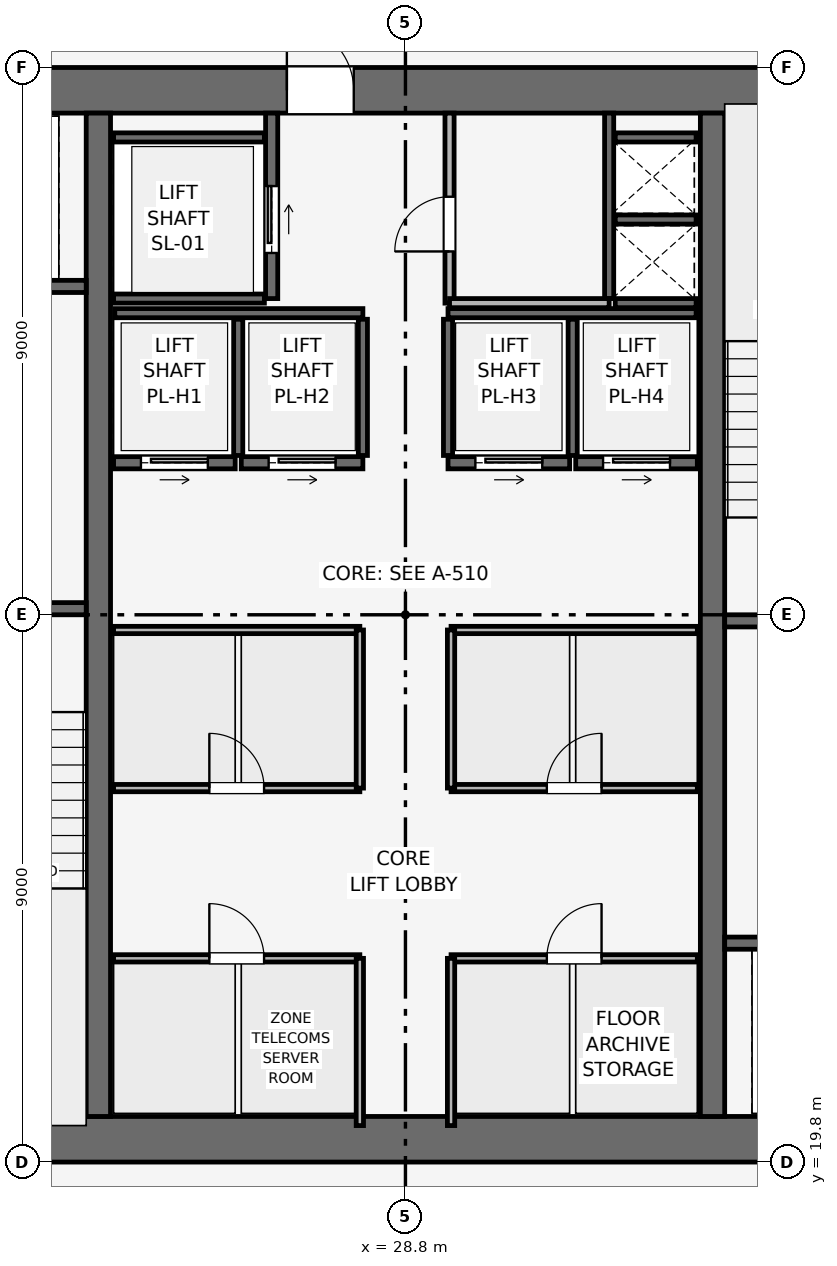
"""IFC4 building model, lengths in metres.
Left out: names, types, materials, properties, quantities, classifications, styles, units other than length and angle.
Written with IfcOpenShell. Run it as: python <this file> out.ifc"""

import sys

from ifc_helpers import new_model, si_unit, direction, frame, frame_2d, origin, place, context, subcontext, project, spatial, rectangle, extrude, element, fill, save


model = new_model("IFC4")
c1 = context("Model", 3, precision=1e-05, world=origin(), true_north=direction((0.0, 1.0)))
c2 = subcontext(c1, "Body", "Model", "MODEL_VIEW")
j1 = project(units=[si_unit("LENGTHUNIT", "METRE"), si_unit("PLANEANGLEUNIT", "RADIAN")], contexts=[c1])
p1 = place(None, origin())
s1 = spatial("IfcSite", under=j1, at=p1, CompositionType="ELEMENT")
p2 = place(p1, origin())
s2 = spatial("IfcBuilding", under=s1, at=p2, CompositionType="ELEMENT")
p3 = place(p2, frame((0.0, 0.0, 261.6)))
s3 = spatial("IfcBuildingStorey", under=s2, at=p3, CompositionType="ELEMENT", Elevation=261.6)
p4 = place(p3, frame((19.8, 20.175, 0.0), z_axis=(0.0, 0.0, 1.0), x_axis=(1.0, 0.0, 0.0)))
e1 = element("IfcWall", 1, at=p4, inside=s3, PredefinedType="SHEAR", context=c2, shape_type="SweptSolid", body=[
    extrude(rectangle(XDim=18.0, YDim=0.75, at=frame_2d((9.0, 0.0))), origin(), (0.0, 0.0, 1.0), 3.75),
])
p5 = place(p3, frame((19.8, 37.425, 0.0), z_axis=(0.0, 0.0, 1.0), x_axis=(1.0, 0.0, 0.0)))
e2 = element("IfcWall", 2, at=p5, inside=s3, PredefinedType="SHEAR", context=c2, shape_type="SweptSolid", body=[
    extrude(rectangle(XDim=18.0, YDim=0.75, at=frame_2d((9.0, 0.0))), origin(), (0.0, 0.0, 1.0), 3.75),
])
p6 = place(p5, frame((7.05, 0.0, 0.0)))
e3 = element("IfcOpeningElement", 3, at=p6, cuts=e2, PredefinedType="OPENING", context=c2, shape_type="SweptSolid", body=[
    extrude(rectangle(XDim=1.1, YDim=2.15, at=frame_2d((0.55, 1.075))), frame((0.0, 0.385, 0.0), z_axis=(0.0, -1.0, 0.0), x_axis=(1.0, 0.0, 0.0)), (0.0, 0.0, 1.0), 0.77),
])
for number, where, z_axis, x_axis in (
    (4, (23.75, 20.55, 0.0), (0.0, 0.0, 1.0), (0.0, 1.0, 0.0)),
    (5, (33.85, 20.55, 0.0), (0.0, 0.0, 1.0), (0.0, 1.0, 0.0)),
):
    element("IfcWall", number, at=place(p3, frame(where, z_axis=z_axis, x_axis=x_axis)), inside=s3, PredefinedType="SHEAR", context=c2, shape_type="SweptSolid", body=[
        extrude(rectangle(XDim=16.5, YDim=0.4, at=frame_2d((8.25, 0.0))), origin(), (0.0, 0.0, 1.0), 3.75),
    ])
p7 = place(p3, frame((20.4, 28.9, 0.0), z_axis=(0.0, 0.0, 1.0), x_axis=(1.0, 0.0, 0.0)))
e6 = element("IfcWall", 6, at=p7, inside=s3, PredefinedType="SHEAR", context=c2, shape_type="SweptSolid", body=[
    extrude(rectangle(XDim=3.15, YDim=0.2, at=frame_2d((1.575, 0.0))), origin(), (0.0, 0.0, 1.0), 3.5),
])
p8 = place(p7, frame((0.8, 0.0, 0.0)))
e7 = element("IfcOpeningElement", 7, at=p8, cuts=e6, PredefinedType="OPENING", context=c2, shape_type="SweptSolid", body=[
    extrude(rectangle(XDim=1.0, YDim=2.1, at=frame_2d((0.5, 1.05))), frame((0.0, 0.11, 0.0), z_axis=(0.0, -1.0, 0.0), x_axis=(1.0, 0.0, 0.0)), (0.0, 0.0, 1.0), 0.22),
])
p9 = place(p3, frame((34.05, 28.7, 0.0), z_axis=(0.0, 0.0, 1.0), x_axis=(1.0, 0.0, 0.0)))
e8 = element("IfcWall", 8, at=p9, inside=s3, PredefinedType="SHEAR", context=c2, shape_type="SweptSolid", body=[
    extrude(rectangle(XDim=3.15, YDim=0.2, at=frame_2d((1.575, 0.0))), origin(), (0.0, 0.0, 1.0), 3.5),
])
p10 = place(p9, frame((0.8, 0.0, 0.0)))
e9 = element("IfcOpeningElement", 9, at=p10, cuts=e8, PredefinedType="OPENING", context=c2, shape_type="SweptSolid", body=[
    extrude(rectangle(XDim=1.0, YDim=2.1, at=frame_2d((0.5, 1.05))), frame((0.0, 0.11, 0.0), z_axis=(0.0, -1.0, 0.0), x_axis=(1.0, 0.0, 0.0)), (0.0, 0.0, 1.0), 0.22),
])
p11 = place(p3, frame((32.15, 34.0, 0.0), z_axis=(0.0, 0.0, 1.0), x_axis=(0.0, 1.0, 0.0)))
e10 = element("IfcWall", 10, at=p11, inside=s3, PredefinedType="SHEAR", context=c2, shape_type="SweptSolid", body=[
    extrude(rectangle(XDim=3.05, YDim=0.15, at=frame_2d((1.525, 0.0))), origin(), (0.0, 0.0, 1.0), 3.5),
])
for number, where, z_axis, x_axis in (
    (11, (32.25, 33.925, 0.0), (0.0, 0.0, 1.0), (1.0, 0.0, 0.0)),
    (12, (32.25, 35.3, 0.0), (0.0, 0.0, 1.0), (1.0, 0.0, 0.0)),
):
    element("IfcWall", number, at=place(p3, frame(where, z_axis=z_axis, x_axis=x_axis)), inside=s3, PredefinedType="SHEAR", context=c2, shape_type="SweptSolid", body=[
        extrude(rectangle(XDim=1.33, YDim=0.15, at=frame_2d((0.665, 0.0))), origin(), (0.0, 0.0, 1.0), 3.5),
    ])
p12 = place(p3, frame((20.5, 34.2, 0.0), z_axis=(0.0, 0.0, 1.0), x_axis=(1.0, 0.0, 0.0)))
e13 = element("IfcWall", 13, at=p12, inside=s3, PredefinedType="SHEAR", context=c2, shape_type="SweptSolid", body=[
    extrude(rectangle(XDim=3.05, YDim=0.2, at=frame_2d((1.525, 0.0))), origin(), (0.0, 0.0, 1.0), 3.5),
])
p13 = place(p12, frame((0.75, 0.0, 0.0)))
e14 = element("IfcOpeningElement", 14, at=p13, cuts=e13, PredefinedType="OPENING", context=c2, shape_type="SweptSolid", body=[
    extrude(rectangle(XDim=1.1, YDim=2.15, at=frame_2d((0.55, 1.075))), frame((0.0, 0.11, 0.0), z_axis=(0.0, -1.0, 0.0), x_axis=(1.0, 0.0, 0.0)), (0.0, 0.0, 1.0), 0.22),
])
p14 = place(p3, frame((34.05, 23.4, 0.0), z_axis=(0.0, 0.0, 1.0), x_axis=(1.0, 0.0, 0.0)))
e15 = element("IfcWall", 15, at=p14, inside=s3, PredefinedType="SHEAR", context=c2, shape_type="SweptSolid", body=[
    extrude(rectangle(XDim=3.05, YDim=0.2, at=frame_2d((1.525, 0.0))), origin(), (0.0, 0.0, 1.0), 3.5),
])
p15 = place(p14, frame((1.2, 0.0, 0.0)))
e16 = element("IfcOpeningElement", 16, at=p15, cuts=e15, PredefinedType="OPENING", context=c2, shape_type="SweptSolid", body=[
    extrude(rectangle(XDim=1.1, YDim=2.15, at=frame_2d((0.55, 1.075))), frame((0.0, 0.11, 0.0), z_axis=(0.0, -1.0, 0.0), x_axis=(1.0, 0.0, 0.0)), (0.0, 0.0, 1.0), 0.22),
])
p16 = place(p3, frame((26.6, 34.0, 0.0), z_axis=(0.0, 0.0, 1.0), x_axis=(0.0, 1.0, 0.0)))
e17 = element("IfcWall", 17, at=p16, inside=s3, PredefinedType="SHEAR", context=c2, shape_type="SweptSolid", body=[
    extrude(rectangle(XDim=3.05, YDim=0.2, at=frame_2d((1.525, 0.0))), origin(), (0.0, 0.0, 1.0), 3.5),
])
p17 = place(p16, frame((0.75, 0.0, 0.0)))
e18 = element("IfcOpeningElement", 18, at=p17, cuts=e17, PredefinedType="OPENING", context=c2, shape_type="SweptSolid", body=[
    extrude(rectangle(XDim=1.1, YDim=2.15, at=frame_2d((0.55, 1.075))), frame((0.0, 0.11, 0.0), z_axis=(0.0, -1.0, 0.0), x_axis=(1.0, 0.0, 0.0)), (0.0, 0.0, 1.0), 0.22),
])
for number, where, z_axis, x_axis in (
    (19, (24.0, 34.0, 0.0), (0.0, 0.0, 1.0), (1.0, 0.0, 0.0)),
    (20, (24.0, 36.65, 0.0), (0.0, 0.0, 1.0), (1.0, 0.0, 0.0)),
):
    element("IfcWall", number, at=place(p3, frame(where, z_axis=z_axis, x_axis=x_axis)), inside=s3, PredefinedType="SHEAR", context=c2, shape_type="SweptSolid", body=[
        extrude(rectangle(XDim=2.48, YDim=0.15, at=frame_2d((1.24, 0.0))), origin(), (0.0, 0.0, 1.0), 3.5),
    ])
p18 = place(p3, frame((24.0, 31.3, 0.0), z_axis=(0.0, 0.0, 1.0), x_axis=(1.0, 0.0, 0.0)))
e21 = element("IfcWall", 21, at=p18, inside=s3, PredefinedType="SHEAR", context=c2, shape_type="SweptSolid", body=[
    extrude(rectangle(XDim=2.0, YDim=0.2, at=frame_2d((1.0, 0.0))), origin(), (0.0, 0.0, 1.0), 3.5),
])
p19 = place(p18, frame((0.45, 0.0, 0.0)))
e22 = element("IfcOpeningElement", 22, at=p19, cuts=e21, PredefinedType="OPENING", context=c2, shape_type="SweptSolid", body=[
    extrude(rectangle(XDim=1.1, YDim=2.15, at=frame_2d((0.55, 1.075))), frame((0.0, 0.11, 0.0), z_axis=(0.0, -1.0, 0.0), x_axis=(1.0, 0.0, 0.0)), (0.0, 0.0, 1.0), 0.22),
])
p20 = place(p3, frame((26.1, 31.3, 0.0), z_axis=(0.0, 0.0, 1.0), x_axis=(1.0, 0.0, 0.0)))
e23 = element("IfcWall", 23, at=p20, inside=s3, PredefinedType="SHEAR", context=c2, shape_type="SweptSolid", body=[
    extrude(rectangle(XDim=2.0, YDim=0.2, at=frame_2d((1.0, 0.0))), origin(), (0.0, 0.0, 1.0), 3.5),
])
p21 = place(p20, frame((0.45, 0.0, 0.0)))
e24 = element("IfcOpeningElement", 24, at=p21, cuts=e23, PredefinedType="OPENING", context=c2, shape_type="SweptSolid", body=[
    extrude(rectangle(XDim=1.1, YDim=2.15, at=frame_2d((0.55, 1.075))), frame((0.0, 0.11, 0.0), z_axis=(0.0, -1.0, 0.0), x_axis=(1.0, 0.0, 0.0)), (0.0, 0.0, 1.0), 0.22),
])
p22 = place(p3, frame((29.5, 31.3, 0.0), z_axis=(0.0, 0.0, 1.0), x_axis=(1.0, 0.0, 0.0)))
e25 = element("IfcWall", 25, at=p22, inside=s3, PredefinedType="SHEAR", context=c2, shape_type="SweptSolid", body=[
    extrude(rectangle(XDim=2.0, YDim=0.2, at=frame_2d((1.0, 0.0))), origin(), (0.0, 0.0, 1.0), 3.5),
])
p23 = place(p22, frame((0.45, 0.0, 0.0)))
e26 = element("IfcOpeningElement", 26, at=p23, cuts=e25, PredefinedType="OPENING", context=c2, shape_type="SweptSolid", body=[
    extrude(rectangle(XDim=1.1, YDim=2.15, at=frame_2d((0.55, 1.075))), frame((0.0, 0.11, 0.0), z_axis=(0.0, -1.0, 0.0), x_axis=(1.0, 0.0, 0.0)), (0.0, 0.0, 1.0), 0.22),
])
p24 = place(p3, frame((31.6, 31.3, 0.0), z_axis=(0.0, 0.0, 1.0), x_axis=(1.0, 0.0, 0.0)))
e27 = element("IfcWall", 27, at=p24, inside=s3, PredefinedType="SHEAR", context=c2, shape_type="SweptSolid", body=[
    extrude(rectangle(XDim=2.0, YDim=0.2, at=frame_2d((1.0, 0.0))), origin(), (0.0, 0.0, 1.0), 3.5),
])
p25 = place(p24, frame((0.45, 0.0, 0.0)))
e28 = element("IfcOpeningElement", 28, at=p25, cuts=e27, PredefinedType="OPENING", context=c2, shape_type="SweptSolid", body=[
    extrude(rectangle(XDim=1.1, YDim=2.15, at=frame_2d((0.55, 1.075))), frame((0.0, 0.11, 0.0), z_axis=(0.0, -1.0, 0.0), x_axis=(1.0, 0.0, 0.0)), (0.0, 0.0, 1.0), 0.22),
])
p26 = place(p3, frame((32.25, 36.65, 0.0), z_axis=(0.0, 0.0, 1.0), x_axis=(1.0, 0.0, 0.0)))
e29 = element("IfcWall", 29, at=p26, inside=s3, PredefinedType="SHEAR", context=c2, shape_type="SweptSolid", body=[
    extrude(rectangle(XDim=1.33, YDim=0.15, at=frame_2d((0.665, 0.0))), origin(), (0.0, 0.0, 1.0), 3.5),
])
for number, where, z_axis, x_axis in (
    (30, (24.02, 33.76, 0.0), (0.0, 0.0, 1.0), (1.0, 0.0, 0.0)),
    (31, (29.5, 33.76, 0.0), (0.0, 0.0, 1.0), (1.0, 0.0, 0.0)),
):
    element("IfcWall", number, at=place(p3, frame(where, z_axis=z_axis, x_axis=x_axis)), inside=s3, PredefinedType="SHEAR", context=c2, shape_type="SweptSolid", body=[
        extrude(rectangle(XDim=4.08, YDim=0.15, at=frame_2d((2.04, 0.0))), origin(), (0.0, 0.0, 1.0), 3.5),
    ])
for number, where, z_axis, x_axis in (
    (32, (26.05, 31.42, 0.0), (0.0, 0.0, 1.0), (0.0, 1.0, 0.0)),
    (33, (28.1, 31.42, 0.0), (0.0, 0.0, 1.0), (0.0, 1.0, 0.0)),
    (34, (29.5, 31.42, 0.0), (0.0, 0.0, 1.0), (0.0, 1.0, 0.0)),
    (35, (31.55, 31.42, 0.0), (0.0, 0.0, 1.0), (0.0, 1.0, 0.0)),
):
    element("IfcWall", number, at=place(p3, frame(where, z_axis=z_axis, x_axis=x_axis)), inside=s3, PredefinedType="SHEAR", context=c2, shape_type="SweptSolid", body=[
        extrude(rectangle(XDim=2.24, YDim=0.15, at=frame_2d((1.12, 0.0))), origin(), (0.0, 0.0, 1.0), 3.5),
    ])
p27 = place(p3, frame((29.525, 33.925, 0.0), z_axis=(0.0, 0.0, 1.0), x_axis=(0.0, 1.0, 0.0)))
e36 = element("IfcWall", 36, at=p27, inside=s3, PredefinedType="PARTITIONING", context=c2, shape_type="SweptSolid", body=[
    extrude(rectangle(XDim=3.125, YDim=0.15, at=frame_2d((1.562, 0.0))), origin(), (0.0, 0.0, 1.0), 3.5),
])
p28 = place(p27, frame((0.85, 0.0, 0.0)))
e37 = element("IfcOpeningElement", 37, at=p28, cuts=e36, PredefinedType="OPENING", context=c2, shape_type="SweptSolid", body=[
    extrude(rectangle(XDim=0.9, YDim=2.1, at=frame_2d((0.45, 1.05))), frame((0.0, 0.085, 0.0), z_axis=(0.0, -1.0, 0.0), x_axis=(1.0, 0.0, 0.0)), (0.0, 0.0, 1.0), 0.17),
])
p29 = place(p3, frame((29.525, 33.925, 0.0), z_axis=(0.0, 0.0, 1.0), x_axis=(1.0, 0.0, 0.0)))
e38 = element("IfcWall", 38, at=p29, inside=s3, PredefinedType="PARTITIONING", context=c2, shape_type="SweptSolid", body=[
    extrude(rectangle(XDim=2.625, YDim=0.15, at=frame_2d((1.312, 0.0))), origin(), (0.0, 0.0, 1.0), 3.5),
])
p30 = place(p3, frame((24.0, 23.15, 0.0), z_axis=(0.0, 0.0, 1.0), x_axis=(1.0, 0.0, 0.0)))
e39 = element("IfcWall", 39, at=p30, inside=s3, PredefinedType="PARTITIONING", context=c2, shape_type="SweptSolid", body=[
    extrude(rectangle(XDim=4.05, YDim=0.12, at=frame_2d((2.025, 0.0))), origin(), (0.0, 0.0, 1.0), 3.5),
])
p31 = place(p30, frame((1.575, 0.0, 0.0)))
e40 = element("IfcOpeningElement", 40, at=p31, cuts=e39, PredefinedType="OPENING", context=c2, shape_type="SweptSolid", body=[
    extrude(rectangle(XDim=0.9, YDim=2.1, at=frame_2d((0.45, 1.05))), frame((0.0, 0.07, 0.0), z_axis=(0.0, -1.0, 0.0), x_axis=(1.0, 0.0, 0.0)), (0.0, 0.0, 1.0), 0.14),
])
p32 = place(p3, frame((28.05, 20.4, 0.0), z_axis=(0.0, 0.0, 1.0), x_axis=(0.0, 1.0, 0.0)))
e41 = element("IfcWall", 41, at=p32, inside=s3, PredefinedType="PARTITIONING", context=c2, shape_type="SweptSolid", body=[
    extrude(rectangle(XDim=2.75, YDim=0.12, at=frame_2d((1.375, 0.0))), origin(), (0.0, 0.0, 1.0), 3.5),
])
p33 = place(p3, frame((29.55, 23.15, 0.0), z_axis=(0.0, 0.0, 1.0), x_axis=(1.0, 0.0, 0.0)))
e42 = element("IfcWall", 42, at=p33, inside=s3, PredefinedType="PARTITIONING", context=c2, shape_type="SweptSolid", body=[
    extrude(rectangle(XDim=4.05, YDim=0.12, at=frame_2d((2.025, 0.0))), origin(), (0.0, 0.0, 1.0), 3.5),
])
p34 = place(p33, frame((1.575, 0.0, 0.0)))
e43 = element("IfcOpeningElement", 43, at=p34, cuts=e42, PredefinedType="OPENING", context=c2, shape_type="SweptSolid", body=[
    extrude(rectangle(XDim=0.9, YDim=2.1, at=frame_2d((0.45, 1.05))), frame((0.0, 0.07, 0.0), z_axis=(0.0, -1.0, 0.0), x_axis=(1.0, 0.0, 0.0)), (0.0, 0.0, 1.0), 0.14),
])
p35 = place(p3, frame((29.55, 20.4, 0.0), z_axis=(0.0, 0.0, 1.0), x_axis=(0.0, 1.0, 0.0)))
e44 = element("IfcWall", 44, at=p35, inside=s3, PredefinedType="PARTITIONING", context=c2, shape_type="SweptSolid", body=[
    extrude(rectangle(XDim=2.75, YDim=0.12, at=frame_2d((1.375, 0.0))), origin(), (0.0, 0.0, 1.0), 3.5),
])
p36 = place(p3, frame((24.0, 25.95, 0.0), z_axis=(0.0, 0.0, 1.0), x_axis=(1.0, 0.0, 0.0)))
e45 = element("IfcWall", 45, at=p36, inside=s3, PredefinedType="PARTITIONING", context=c2, shape_type="SweptSolid", body=[
    extrude(rectangle(XDim=4.05, YDim=0.12, at=frame_2d((2.025, 0.0))), origin(), (0.0, 0.0, 1.0), 3.5),
])
p37 = place(p36, frame((1.575, 0.0, 0.0)))
e46 = element("IfcOpeningElement", 46, at=p37, cuts=e45, PredefinedType="OPENING", context=c2, shape_type="SweptSolid", body=[
    extrude(rectangle(XDim=0.9, YDim=2.1, at=frame_2d((0.45, 1.05))), frame((0.0, 0.07, 0.0), z_axis=(0.0, -1.0, 0.0), x_axis=(1.0, 0.0, 0.0)), (0.0, 0.0, 1.0), 0.14),
])
p38 = place(p3, frame((24.0, 28.55, 0.0), z_axis=(0.0, 0.0, 1.0), x_axis=(1.0, 0.0, 0.0)))
e47 = element("IfcWall", 47, at=p38, inside=s3, PredefinedType="PARTITIONING", context=c2, shape_type="SweptSolid", body=[
    extrude(rectangle(XDim=4.05, YDim=0.12, at=frame_2d((2.025, 0.0))), origin(), (0.0, 0.0, 1.0), 3.5),
])
p39 = place(p3, frame((28.05, 25.95, 0.0), z_axis=(0.0, 0.0, 1.0), x_axis=(0.0, 1.0, 0.0)))
e48 = element("IfcWall", 48, at=p39, inside=s3, PredefinedType="PARTITIONING", context=c2, shape_type="SweptSolid", body=[
    extrude(rectangle(XDim=2.6, YDim=0.12, at=frame_2d((1.3, 0.0))), origin(), (0.0, 0.0, 1.0), 3.5),
])
p40 = place(p3, frame((29.55, 25.95, 0.0), z_axis=(0.0, 0.0, 1.0), x_axis=(1.0, 0.0, 0.0)))
e49 = element("IfcWall", 49, at=p40, inside=s3, PredefinedType="PARTITIONING", context=c2, shape_type="SweptSolid", body=[
    extrude(rectangle(XDim=4.05, YDim=0.12, at=frame_2d((2.025, 0.0))), origin(), (0.0, 0.0, 1.0), 3.5),
])
p41 = place(p40, frame((1.575, 0.0, 0.0)))
e50 = element("IfcOpeningElement", 50, at=p41, cuts=e49, PredefinedType="OPENING", context=c2, shape_type="SweptSolid", body=[
    extrude(rectangle(XDim=0.9, YDim=2.1, at=frame_2d((0.45, 1.05))), frame((0.0, 0.07, 0.0), z_axis=(0.0, -1.0, 0.0), x_axis=(1.0, 0.0, 0.0)), (0.0, 0.0, 1.0), 0.14),
])
p42 = place(p3, frame((29.55, 28.55, 0.0), z_axis=(0.0, 0.0, 1.0), x_axis=(1.0, 0.0, 0.0)))
e51 = element("IfcWall", 51, at=p42, inside=s3, PredefinedType="PARTITIONING", context=c2, shape_type="SweptSolid", body=[
    extrude(rectangle(XDim=4.05, YDim=0.12, at=frame_2d((2.025, 0.0))), origin(), (0.0, 0.0, 1.0), 3.5),
])
p43 = place(p3, frame((29.55, 25.95, 0.0), z_axis=(0.0, 0.0, 1.0), x_axis=(0.0, 1.0, 0.0)))
e52 = element("IfcWall", 52, at=p43, inside=s3, PredefinedType="PARTITIONING", context=c2, shape_type="SweptSolid", body=[
    extrude(rectangle(XDim=2.6, YDim=0.12, at=frame_2d((1.3, 0.0))), origin(), (0.0, 0.0, 1.0), 3.5),
])
p44 = place(p17, origin())
e53 = element("IfcDoor", 53, at=p44, inside=s3, OperationType="SLIDING_TO_RIGHT", PredefinedType="DOOR", context=c2, shape_type="SweptSolid", body=[
    extrude(rectangle(XDim=1.1, YDim=2.15, at=frame_2d((0.55, 1.075))), frame((0.0, 0.025, 0.0), z_axis=(0.0, -1.0, 0.0), x_axis=(1.0, 0.0, 0.0)), (0.0, 0.0, 1.0), 0.05),
])
fill(e18, e53)
p45 = place(p19, origin())
e54 = element("IfcDoor", 54, at=p45, inside=s3, OperationType="SLIDING_TO_RIGHT", PredefinedType="DOOR", context=c2, shape_type="SweptSolid", body=[
    extrude(rectangle(XDim=1.1, YDim=2.15, at=frame_2d((0.55, 1.075))), frame((0.0, 0.025, 0.0), z_axis=(0.0, -1.0, 0.0), x_axis=(1.0, 0.0, 0.0)), (0.0, 0.0, 1.0), 0.05),
])
fill(e22, e54)
p46 = place(p21, origin())
e55 = element("IfcDoor", 55, at=p46, inside=s3, OperationType="SLIDING_TO_RIGHT", PredefinedType="DOOR", context=c2, shape_type="SweptSolid", body=[
    extrude(rectangle(XDim=1.1, YDim=2.15, at=frame_2d((0.55, 1.075))), frame((0.0, 0.025, 0.0), z_axis=(0.0, -1.0, 0.0), x_axis=(1.0, 0.0, 0.0)), (0.0, 0.0, 1.0), 0.05),
])
fill(e24, e55)
p47 = place(p23, origin())
e56 = element("IfcDoor", 56, at=p47, inside=s3, OperationType="SLIDING_TO_RIGHT", PredefinedType="DOOR", context=c2, shape_type="SweptSolid", body=[
    extrude(rectangle(XDim=1.1, YDim=2.15, at=frame_2d((0.55, 1.075))), frame((0.0, 0.025, 0.0), z_axis=(0.0, -1.0, 0.0), x_axis=(1.0, 0.0, 0.0)), (0.0, 0.0, 1.0), 0.05),
])
fill(e26, e56)
p48 = place(p25, origin())
e57 = element("IfcDoor", 57, at=p48, inside=s3, OperationType="SLIDING_TO_RIGHT", PredefinedType="DOOR", context=c2, shape_type="SweptSolid", body=[
    extrude(rectangle(XDim=1.1, YDim=2.15, at=frame_2d((0.55, 1.075))), frame((0.0, 0.025, 0.0), z_axis=(0.0, -1.0, 0.0), x_axis=(1.0, 0.0, 0.0)), (0.0, 0.0, 1.0), 0.05),
])
fill(e28, e57)
p49 = place(p28, origin())
e58 = element("IfcDoor", 58, at=p49, inside=s3, OperationType="SINGLE_SWING_LEFT", PredefinedType="DOOR", context=c2, shape_type="SweptSolid", body=[
    extrude(rectangle(XDim=0.9, YDim=2.1, at=frame_2d((0.45, 1.05))), frame((0.0, 0.025, 0.0), z_axis=(0.0, -1.0, 0.0), x_axis=(1.0, 0.0, 0.0)), (0.0, 0.0, 1.0), 0.05),
])
fill(e37, e58)
p50 = place(p31, origin())
e59 = element("IfcDoor", 59, at=p50, inside=s3, OperationType="SINGLE_SWING_LEFT", PredefinedType="DOOR", context=c2, shape_type="SweptSolid", body=[
    extrude(rectangle(XDim=0.9, YDim=2.1, at=frame_2d((0.45, 1.05))), frame((0.0, 0.025, 0.0), z_axis=(0.0, -1.0, 0.0), x_axis=(1.0, 0.0, 0.0)), (0.0, 0.0, 1.0), 0.05),
])
fill(e40, e59)
p51 = place(p34, origin())
e60 = element("IfcDoor", 60, at=p51, inside=s3, OperationType="SINGLE_SWING_RIGHT", PredefinedType="DOOR", context=c2, shape_type="SweptSolid", body=[
    extrude(rectangle(XDim=0.9, YDim=2.1, at=frame_2d((0.45, 1.05))), frame((0.0, 0.025, 0.0), z_axis=(0.0, -1.0, 0.0), x_axis=(1.0, 0.0, 0.0)), (0.0, 0.0, 1.0), 0.05),
])
fill(e43, e60)
p52 = place(p37, origin())
e61 = element("IfcDoor", 61, at=p52, inside=s3, OperationType="SINGLE_SWING_LEFT", PredefinedType="DOOR", context=c2, shape_type="SweptSolid", body=[
    extrude(rectangle(XDim=0.9, YDim=2.1, at=frame_2d((0.45, 1.05))), frame((0.0, 0.025, 0.0), z_axis=(0.0, -1.0, 0.0), x_axis=(1.0, 0.0, 0.0)), (0.0, 0.0, 1.0), 0.05),
])
fill(e46, e61)
p53 = place(p41, origin())
e62 = element("IfcDoor", 62, at=p53, inside=s3, OperationType="SINGLE_SWING_RIGHT", PredefinedType="DOOR", context=c2, shape_type="SweptSolid", body=[
    extrude(rectangle(XDim=0.9, YDim=2.1, at=frame_2d((0.45, 1.05))), frame((0.0, 0.025, 0.0), z_axis=(0.0, -1.0, 0.0), x_axis=(1.0, 0.0, 0.0)), (0.0, 0.0, 1.0), 0.05),
])
fill(e50, e62)
p54 = place(p6, origin())
e63 = element("IfcDoor", 63, at=p54, inside=s3, OperationType="SINGLE_SWING_LEFT", PredefinedType="DOOR", context=c2, shape_type="SweptSolid", body=[
    extrude(rectangle(XDim=1.1, YDim=2.15, at=frame_2d((0.55, 1.075))), frame((0.0, 0.025, 0.0), z_axis=(0.0, -1.0, 0.0), x_axis=(1.0, 0.0, 0.0)), (0.0, 0.0, 1.0), 0.05),
])
fill(e3, e63)
save(model, sys.argv[1])
